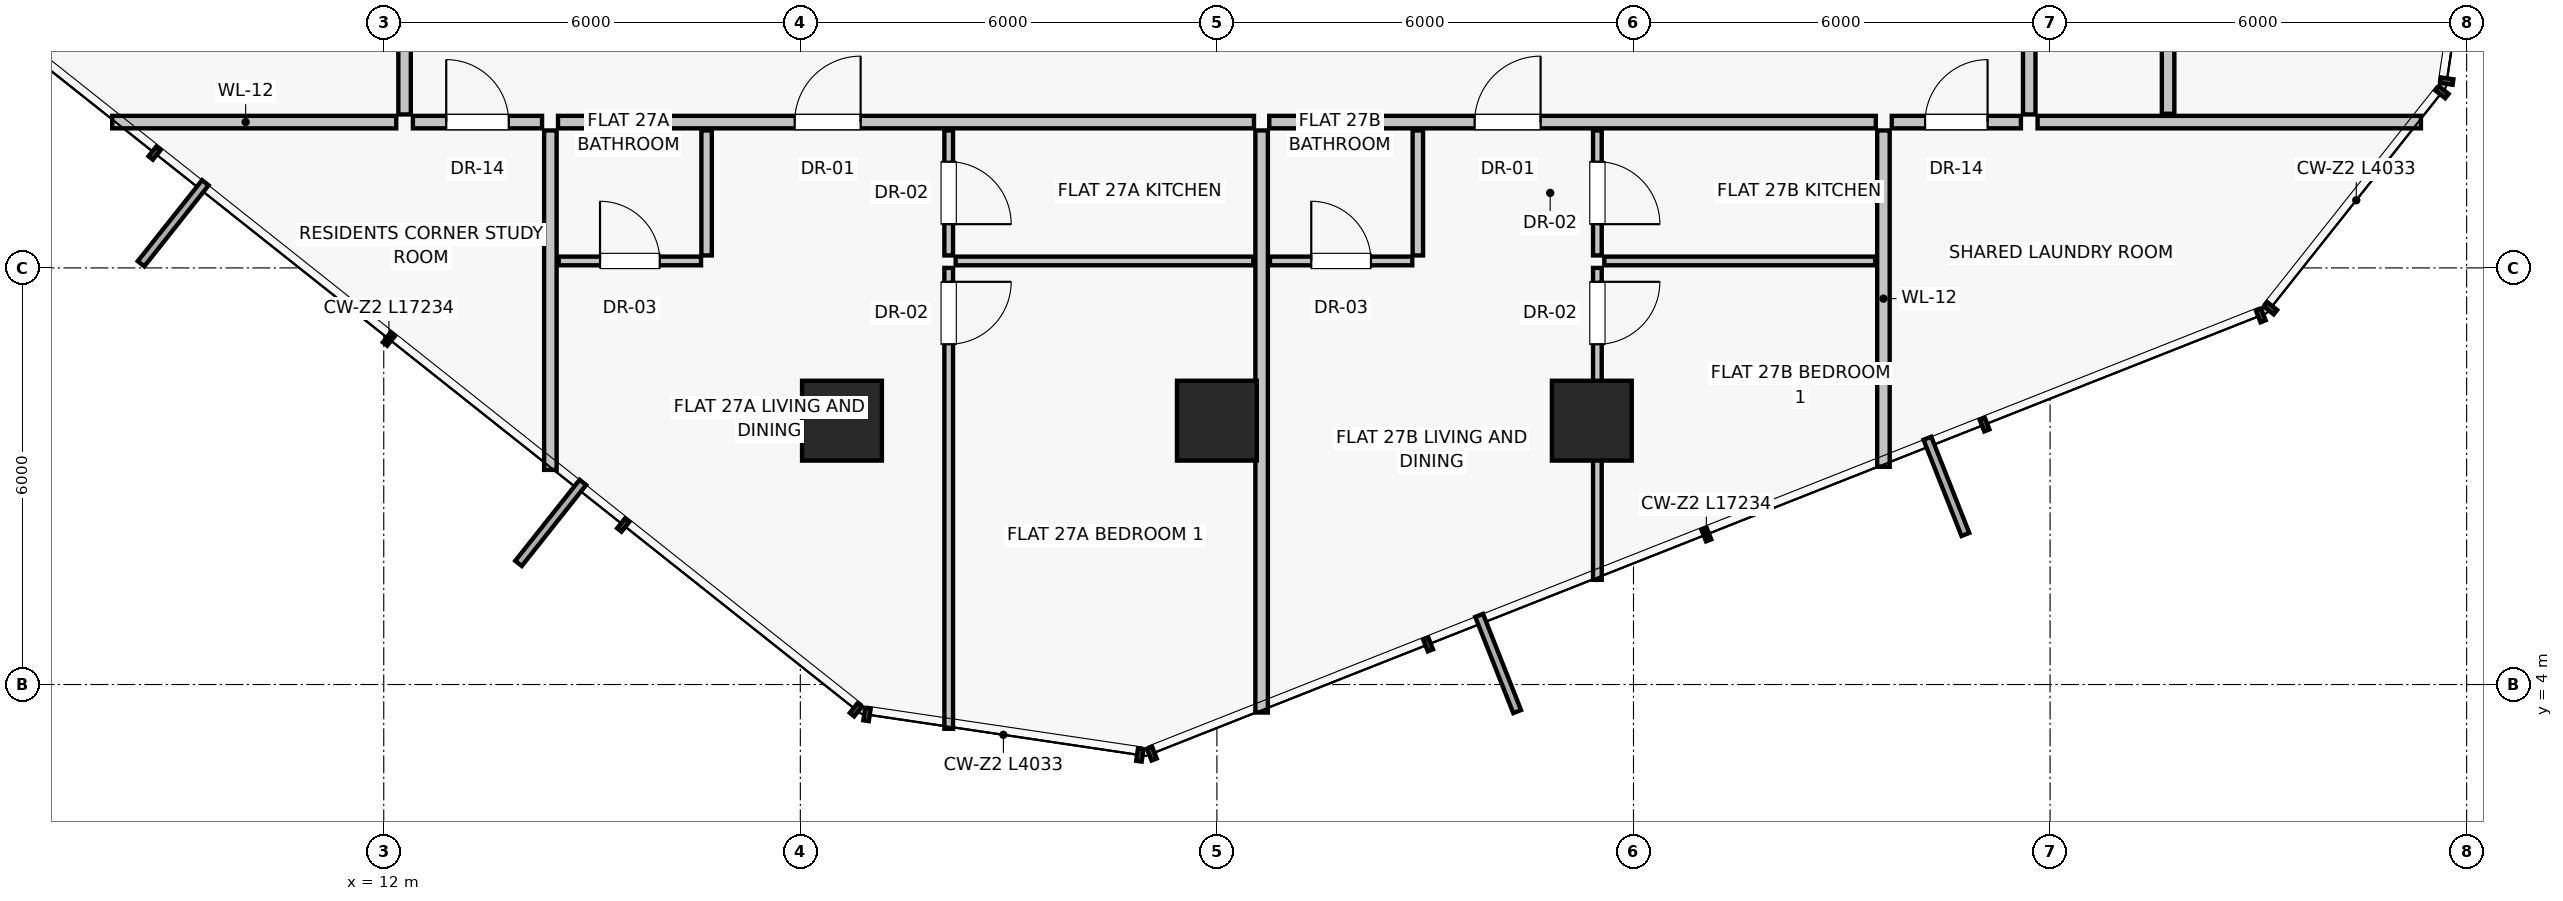
"""IFC4 building model, lengths in metres.
Left out: names, types, materials, properties, quantities, classifications, styles, units other than length and angle.
Written with IfcOpenShell. Run it as: python <this file> out.ifc"""

import sys

from ifc_helpers import new_model, si_unit, direction, frame, frame_2d, origin, origin_2d, place, context, subcontext, project, spatial, rectangle, extrude, source, transform, mapped, element, fill, save


model = new_model("IFC4")
c1 = context("Model", 3, precision=1e-05, world=origin(), true_north=direction((0.0, 1.0)))
c2 = subcontext(c1, "Body", "Model", "MODEL_VIEW")
j1 = project(units=[si_unit("LENGTHUNIT", "METRE"), si_unit("PLANEANGLEUNIT", "RADIAN")], contexts=[c1])
p1 = place(None, origin())
s1 = spatial("IfcSite", under=j1, at=p1, CompositionType="ELEMENT")
p2 = place(p1, origin())
s2 = spatial("IfcBuilding", under=s1, at=p2, CompositionType="ELEMENT")
p3 = place(p2, frame((0.0, 0.0, 99.2)))
s3 = spatial("IfcBuildingStorey", under=s2, at=p3, CompositionType="ELEMENT", Elevation=99.2)
for number, where, z_axis, x_axis in (
    (1, (18.6, 7.8, 0.0), (0.0, 0.0, 1.0), (1.0, 0.0, 0.0)),
    (2, (24.0, 7.8, 0.0), (0.0, 0.0, 1.0), (1.0, 0.0, 0.0)),
    (3, (29.4, 7.8, 0.0), (0.0, 0.0, 1.0), (1.0, 0.0, 0.0)),
):
    element("IfcColumn", number, at=place(p3, frame(where, z_axis=z_axis, x_axis=x_axis)), inside=s3, PredefinedType="COLUMN", context=c2, shape_type="SweptSolid", body=[
        extrude(rectangle(XDim=1.15, YDim=1.15, at=origin_2d()), origin(), (0.0, 0.0, 1.0), 3.25),
    ])
p4 = place(p3, frame((14.4, 11.98, 0.0), z_axis=(0.0, 0.0, 1.0), x_axis=(0.0, -1.0, 0.0)))
e4 = element("IfcWall", 4, at=p4, inside=s3, PredefinedType="PARTITIONING", context=c2, shape_type="SweptSolid", body=[
    extrude(rectangle(XDim=4.889, YDim=0.18, at=frame_2d((2.444, 0.0))), origin(), (0.0, 0.0, 1.0), 3.0),
])
p5 = place(p3, frame((33.6, 11.98, 0.0), z_axis=(0.0, 0.0, 1.0), x_axis=(0.0, -1.0, 0.0)))
e5 = element("IfcWall", 5, at=p5, inside=s3, PredefinedType="PARTITIONING", context=c2, shape_type="SweptSolid", body=[
    extrude(rectangle(XDim=4.845, YDim=0.18, at=frame_2d((2.422, 0.0))), origin(), (0.0, 0.0, 1.0), 3.0),
])
p6 = place(p3, frame((14.51, 12.1, 0.0), z_axis=(0.0, 0.0, 1.0), x_axis=(1.0, 0.0, 0.0)))
e6 = element("IfcWall", 6, at=p6, inside=s3, PredefinedType="PARTITIONING", context=c2, shape_type="SweptSolid", body=[
    extrude(rectangle(XDim=10.024, YDim=0.18, at=frame_2d((5.012, 0.0))), origin(), (0.0, 0.0, 1.0), 2.58),
])
p7 = place(p6, frame((3.408, 0.0, 0.0)))
e7 = element("IfcOpeningElement", 7, at=p7, cuts=e6, PredefinedType="OPENING", context=c2, shape_type="SweptSolid", body=[
    extrude(rectangle(XDim=0.95, YDim=2.02, at=frame_2d((0.475, 1.01))), frame((0.0, 0.1, 0.0), z_axis=(0.0, -1.0, 0.0), x_axis=(1.0, 0.0, 0.0)), (0.0, 0.0, 1.0), 0.2),
])
p8 = place(p3, frame((16.65, 11.98, 0.0), z_axis=(0.0, 0.0, 1.0), x_axis=(0.0, -1.0, 0.0)))
e8 = element("IfcWall", 8, at=p8, inside=s3, PredefinedType="PARTITIONING", context=c2, shape_type="SweptSolid", body=[
    extrude(rectangle(XDim=1.8, YDim=0.15, at=frame_2d((0.9, 0.0))), origin(), (0.0, 0.0, 1.0), 3.0),
])
p9 = place(p3, frame((14.52, 10.1, 0.0), z_axis=(0.0, 0.0, 1.0), x_axis=(1.0, 0.0, 0.0)))
e9 = element("IfcWall", 9, at=p9, inside=s3, PredefinedType="PARTITIONING", context=c2, shape_type="SweptSolid", body=[
    extrude(rectangle(XDim=2.05, YDim=0.125, at=frame_2d((1.025, 0.0))), origin(), (0.0, 0.0, 1.0), 3.0),
])
p10 = place(p9, frame((0.595, 0.0, 0.0)))
e10 = element("IfcOpeningElement", 10, at=p10, cuts=e9, PredefinedType="OPENING", context=c2, shape_type="SweptSolid", body=[
    extrude(rectangle(XDim=0.86, YDim=2.01, at=frame_2d((0.43, 1.005))), frame((0.0, 0.073, 0.0), z_axis=(0.0, -1.0, 0.0), x_axis=(1.0, 0.0, 0.0)), (0.0, 0.0, 1.0), 0.145),
])
p11 = place(p3, frame((20.137, 11.98, 0.0), z_axis=(0.0, 0.0, 1.0), x_axis=(0.0, -1.0, 0.0)))
e11 = element("IfcWall", 11, at=p11, inside=s3, PredefinedType="PARTITIONING", context=c2, shape_type="SweptSolid", body=[
    extrude(rectangle(XDim=1.8, YDim=0.125, at=frame_2d((0.9, 0.0))), origin(), (0.0, 0.0, 1.0), 3.0),
])
p12 = place(p11, frame((0.45, 0.0, 0.0)))
e12 = element("IfcOpeningElement", 12, at=p12, cuts=e11, PredefinedType="OPENING", context=c2, shape_type="SweptSolid", body=[
    extrude(rectangle(XDim=0.9, YDim=2.01, at=frame_2d((0.45, 1.005))), frame((0.0, 0.073, 0.0), z_axis=(0.0, -1.0, 0.0), x_axis=(1.0, 0.0, 0.0)), (0.0, 0.0, 1.0), 0.145),
])
p13 = place(p3, frame((20.237, 10.1, 0.0), z_axis=(0.0, 0.0, 1.0), x_axis=(1.0, 0.0, 0.0)))
e13 = element("IfcWall", 13, at=p13, inside=s3, PredefinedType="PARTITIONING", context=c2, shape_type="SweptSolid", body=[
    extrude(rectangle(XDim=4.287, YDim=0.125, at=frame_2d((2.144, 0.0))), origin(), (0.0, 0.0, 1.0), 3.0),
])
p14 = place(p3, frame((20.137, 10.0, 0.0), z_axis=(0.0, 0.0, 1.0), x_axis=(0.0, -1.0, 0.0)))
e14 = element("IfcWall", 14, at=p14, inside=s3, PredefinedType="PARTITIONING", context=c2, shape_type="SweptSolid", body=[
    extrude(rectangle(XDim=6.638, YDim=0.125, at=frame_2d((3.319, 0.0))), origin(), (0.0, 0.0, 1.0), 3.0),
])
p15 = place(p14, frame((0.2, 0.0, 0.0)))
e15 = element("IfcOpeningElement", 15, at=p15, cuts=e14, PredefinedType="OPENING", context=c2, shape_type="SweptSolid", body=[
    extrude(rectangle(XDim=0.9, YDim=2.01, at=frame_2d((0.45, 1.005))), frame((0.0, 0.073, 0.0), z_axis=(0.0, -1.0, 0.0), x_axis=(1.0, 0.0, 0.0)), (0.0, 0.0, 1.0), 0.145),
])
p16 = place(p3, frame((24.644, 11.98, 0.0), z_axis=(0.0, 0.0, 1.0), x_axis=(0.0, -1.0, 0.0)))
e16 = element("IfcWall", 16, at=p16, inside=s3, PredefinedType="PARTITIONING", context=c2, shape_type="SweptSolid", body=[
    extrude(rectangle(XDim=8.383, YDim=0.18, at=frame_2d((4.192, 0.0))), origin(), (0.0, 0.0, 1.0), 3.0),
])
p17 = place(p3, frame((24.754, 12.1, 0.0), z_axis=(0.0, 0.0, 1.0), x_axis=(1.0, 0.0, 0.0)))
e17 = element("IfcWall", 17, at=p17, inside=s3, PredefinedType="PARTITIONING", context=c2, shape_type="SweptSolid", body=[
    extrude(rectangle(XDim=8.736, YDim=0.18, at=frame_2d((4.368, 0.0))), origin(), (0.0, 0.0, 1.0), 2.58),
])
p18 = place(p17, frame((2.958, 0.0, 0.0)))
e18 = element("IfcOpeningElement", 18, at=p18, cuts=e17, PredefinedType="OPENING", context=c2, shape_type="SweptSolid", body=[
    extrude(rectangle(XDim=0.95, YDim=2.02, at=frame_2d((0.475, 1.01))), frame((0.0, 0.1, 0.0), z_axis=(0.0, -1.0, 0.0), x_axis=(1.0, 0.0, 0.0)), (0.0, 0.0, 1.0), 0.2),
])
p19 = place(p3, frame((26.894, 11.98, 0.0), z_axis=(0.0, 0.0, 1.0), x_axis=(0.0, -1.0, 0.0)))
e19 = element("IfcWall", 19, at=p19, inside=s3, PredefinedType="PARTITIONING", context=c2, shape_type="SweptSolid", body=[
    extrude(rectangle(XDim=1.8, YDim=0.15, at=frame_2d((0.9, 0.0))), origin(), (0.0, 0.0, 1.0), 3.0),
])
p20 = place(p3, frame((24.764, 10.1, 0.0), z_axis=(0.0, 0.0, 1.0), x_axis=(1.0, 0.0, 0.0)))
e20 = element("IfcWall", 20, at=p20, inside=s3, PredefinedType="PARTITIONING", context=c2, shape_type="SweptSolid", body=[
    extrude(rectangle(XDim=2.05, YDim=0.125, at=frame_2d((1.025, 0.0))), origin(), (0.0, 0.0, 1.0), 3.0),
])
p21 = place(p20, frame((0.595, 0.0, 0.0)))
e21 = element("IfcOpeningElement", 21, at=p21, cuts=e20, PredefinedType="OPENING", context=c2, shape_type="SweptSolid", body=[
    extrude(rectangle(XDim=0.86, YDim=2.01, at=frame_2d((0.43, 1.005))), frame((0.0, 0.073, 0.0), z_axis=(0.0, -1.0, 0.0), x_axis=(1.0, 0.0, 0.0)), (0.0, 0.0, 1.0), 0.145),
])
p22 = place(p3, frame((29.48, 11.98, 0.0), z_axis=(0.0, 0.0, 1.0), x_axis=(0.0, -1.0, 0.0)))
e22 = element("IfcWall", 22, at=p22, inside=s3, PredefinedType="PARTITIONING", context=c2, shape_type="SweptSolid", body=[
    extrude(rectangle(XDim=1.8, YDim=0.125, at=frame_2d((0.9, 0.0))), origin(), (0.0, 0.0, 1.0), 2.378),
])
p23 = place(p22, frame((0.45, 0.0, 0.0)))
e23 = element("IfcOpeningElement", 23, at=p23, cuts=e22, PredefinedType="OPENING", context=c2, shape_type="SweptSolid", body=[
    extrude(rectangle(XDim=0.9, YDim=2.01, at=frame_2d((0.45, 1.005))), frame((0.0, 0.073, 0.0), z_axis=(0.0, -1.0, 0.0), x_axis=(1.0, 0.0, 0.0)), (0.0, 0.0, 1.0), 0.145),
])
p24 = place(p3, frame((29.58, 10.1, 0.0), z_axis=(0.0, 0.0, 1.0), x_axis=(1.0, 0.0, 0.0)))
e24 = element("IfcWall", 24, at=p24, inside=s3, PredefinedType="PARTITIONING", context=c2, shape_type="SweptSolid", body=[
    extrude(rectangle(XDim=3.9, YDim=0.125, at=frame_2d((1.95, 0.0))), origin(), (0.0, 0.0, 1.0), 3.0),
])
p25 = place(p3, frame((29.48, 10.0, 0.0), z_axis=(0.0, 0.0, 1.0), x_axis=(0.0, -1.0, 0.0)))
e25 = element("IfcWall", 25, at=p25, inside=s3, PredefinedType="PARTITIONING", context=c2, shape_type="SweptSolid", body=[
    extrude(rectangle(XDim=4.493, YDim=0.125, at=frame_2d((2.246, 0.0))), origin(), (0.0, 0.0, 1.0), 2.378),
])
p26 = place(p25, frame((0.2, 0.0, 0.0)))
e26 = element("IfcOpeningElement", 26, at=p26, cuts=e25, PredefinedType="OPENING", context=c2, shape_type="SweptSolid", body=[
    extrude(rectangle(XDim=0.9, YDim=2.01, at=frame_2d((0.45, 1.005))), frame((0.0, 0.073, 0.0), z_axis=(0.0, -1.0, 0.0), x_axis=(1.0, 0.0, 0.0)), (0.0, 0.0, 1.0), 0.145),
])
p27 = place(p3, frame((12.18, 12.1, 0.0), z_axis=(0.0, 0.0, 1.0), x_axis=(-1.0, 0.0, 0.0)))
e27 = element("IfcWall", 27, at=p27, inside=s3, PredefinedType="PARTITIONING", context=c2, shape_type="SweptSolid", body=[
    extrude(rectangle(XDim=4.091, YDim=0.18, at=frame_2d((2.045, 0.0))), origin(), (0.0, 0.0, 1.0), 3.0),
])
p28 = place(p3, frame((12.3, 12.21, 0.0), z_axis=(0.0, 0.0, 1.0), x_axis=(0.0, 1.0, 0.0)))
e28 = element("IfcWall", 28, at=p28, inside=s3, PredefinedType="PARTITIONING", context=c2, shape_type="SweptSolid", body=[
    extrude(rectangle(XDim=4.626, YDim=0.18, at=frame_2d((2.313, 0.0))), origin(), (0.0, 0.0, 1.0), 3.0),
])
p29 = place(p28, frame((1.813, 0.0, 0.0)))
e29 = element("IfcOpeningElement", 29, at=p29, cuts=e28, PredefinedType="OPENING", context=c2, shape_type="SweptSolid", body=[
    extrude(rectangle(XDim=1.0, YDim=2.01, at=frame_2d((0.5, 1.005))), frame((0.0, 0.1, 0.0), z_axis=(0.0, -1.0, 0.0), x_axis=(1.0, 0.0, 0.0)), (0.0, 0.0, 1.0), 0.2),
])
p30 = place(p3, frame((35.82, 12.1, 0.0), z_axis=(0.0, 0.0, 1.0), x_axis=(1.0, 0.0, 0.0)))
e30 = element("IfcWall", 30, at=p30, inside=s3, PredefinedType="PARTITIONING", context=c2, shape_type="SweptSolid", body=[
    extrude(rectangle(XDim=5.521, YDim=0.18, at=frame_2d((2.761, 0.0))), origin(), (0.0, 0.0, 1.0), 3.0),
])
p31 = place(p3, frame((35.7, 12.21, 0.0), z_axis=(0.0, 0.0, 1.0), x_axis=(0.0, 1.0, 0.0)))
e31 = element("IfcWall", 31, at=p31, inside=s3, PredefinedType="PARTITIONING", context=c2, shape_type="SweptSolid", body=[
    extrude(rectangle(XDim=6.28, YDim=0.18, at=frame_2d((3.14, 0.0))), origin(), (0.0, 0.0, 1.0), 2.58),
])
p32 = place(p31, frame((2.64, 0.0, 0.0)))
e32 = element("IfcOpeningElement", 32, at=p32, cuts=e31, PredefinedType="OPENING", context=c2, shape_type="SweptSolid", body=[
    extrude(rectangle(XDim=1.0, YDim=2.01, at=frame_2d((0.5, 1.005))), frame((0.0, 0.1, 0.0), z_axis=(0.0, -1.0, 0.0), x_axis=(1.0, 0.0, 0.0)), (0.0, 0.0, 1.0), 0.2),
])
p33 = place(p3, frame((37.7, 12.22, 0.0), z_axis=(0.0, 0.0, 1.0), x_axis=(0.0, 1.0, 0.0)))
e33 = element("IfcWall", 33, at=p33, inside=s3, PredefinedType="PARTITIONING", context=c2, shape_type="SweptSolid", body=[
    extrude(rectangle(XDim=6.28, YDim=0.18, at=frame_2d((3.14, 0.0))), origin(), (0.0, 0.0, 1.0), 3.0),
])
p34 = place(p3, frame((12.42, 12.1, 0.0), z_axis=(0.0, 0.0, 1.0), x_axis=(1.0, 0.0, 0.0)))
e34 = element("IfcWall", 34, at=p34, inside=s3, PredefinedType="PARTITIONING", context=c2, shape_type="SweptSolid", body=[
    extrude(rectangle(XDim=1.86, YDim=0.18, at=frame_2d((0.93, 0.0))), origin(), (0.0, 0.0, 1.0), 3.0),
])
p35 = place(p34, frame((0.48, 0.0, 0.0)))
e35 = element("IfcOpeningElement", 35, at=p35, cuts=e34, PredefinedType="OPENING", context=c2, shape_type="SweptSolid", body=[
    extrude(rectangle(XDim=0.9, YDim=2.01, at=frame_2d((0.45, 1.005))), frame((0.0, 0.1, 0.0), z_axis=(0.0, -1.0, 0.0), x_axis=(1.0, 0.0, 0.0)), (0.0, 0.0, 1.0), 0.2),
])
p36 = place(p3, frame((33.72, 12.1, 0.0), z_axis=(0.0, 0.0, 1.0), x_axis=(1.0, 0.0, 0.0)))
e36 = element("IfcWall", 36, at=p36, inside=s3, PredefinedType="PARTITIONING", context=c2, shape_type="SweptSolid", body=[
    extrude(rectangle(XDim=1.86, YDim=0.18, at=frame_2d((0.93, 0.0))), origin(), (0.0, 0.0, 1.0), 3.0),
])
p37 = place(p36, frame((0.48, 0.0, 0.0)))
e37 = element("IfcOpeningElement", 37, at=p37, cuts=e36, PredefinedType="OPENING", context=c2, shape_type="SweptSolid", body=[
    extrude(rectangle(XDim=0.9, YDim=2.01, at=frame_2d((0.45, 1.005))), frame((0.0, 0.1, 0.0), z_axis=(0.0, -1.0, 0.0), x_axis=(1.0, 0.0, 0.0)), (0.0, 0.0, 1.0), 0.2),
])
m1 = source(origin(), c2, "Body", "SweptSolid", [
    extrude(rectangle(XDim=0.95, YDim=2.02, at=frame_2d((0.475, 1.01))), frame((0.0, 0.025, 0.0), z_axis=(0.0, -1.0, 0.0), x_axis=(1.0, 0.0, 0.0)), (0.0, 0.0, 1.0), 0.05),
])
p38 = place(p7, origin())
e38 = element("IfcDoor", 38, at=p38, inside=s3, OperationType="SINGLE_SWING_RIGHT", PredefinedType="DOOR", context=c2, shape_type="MappedRepresentation", body=[
    mapped(m1, transform((0.0, 0.0, 0.0), scale=1.0)),
])
fill(e7, e38)
m2 = source(origin(), c2, "Body", "SweptSolid", [
    extrude(rectangle(XDim=0.86, YDim=2.01, at=frame_2d((0.43, 1.005))), frame((0.0, 0.025, 0.0), z_axis=(0.0, -1.0, 0.0), x_axis=(1.0, 0.0, 0.0)), (0.0, 0.0, 1.0), 0.05),
])
p39 = place(p10, origin())
e39 = element("IfcDoor", 39, at=p39, inside=s3, OperationType="SINGLE_SWING_LEFT", PredefinedType="DOOR", context=c2, shape_type="MappedRepresentation", body=[
    mapped(m2, transform((0.0, 0.0, 0.0), scale=1.0)),
])
fill(e10, e39)
m3 = source(origin(), c2, "Body", "SweptSolid", [
    extrude(rectangle(XDim=0.9, YDim=2.01, at=frame_2d((0.45, 1.005))), frame((0.0, 0.025, 0.0), z_axis=(0.0, -1.0, 0.0), x_axis=(1.0, 0.0, 0.0)), (0.0, 0.0, 1.0), 0.05),
])
p40 = place(p12, origin())
e40 = element("IfcDoor", 40, at=p40, inside=s3, OperationType="SINGLE_SWING_RIGHT", PredefinedType="DOOR", context=c2, shape_type="MappedRepresentation", body=[
    mapped(m3, transform((0.0, 0.0, 0.0), scale=1.0)),
])
fill(e12, e40)
p41 = place(p15, origin())
e41 = element("IfcDoor", 41, at=p41, inside=s3, OperationType="SINGLE_SWING_LEFT", PredefinedType="DOOR", context=c2, shape_type="MappedRepresentation", body=[
    mapped(m3, transform((0.0, 0.0, 0.0), scale=1.0)),
])
fill(e15, e41)
p42 = place(p18, origin())
e42 = element("IfcDoor", 42, at=p42, inside=s3, OperationType="SINGLE_SWING_RIGHT", PredefinedType="DOOR", context=c2, shape_type="MappedRepresentation", body=[
    mapped(m1, transform((0.0, 0.0, 0.0), scale=1.0)),
])
fill(e18, e42)
p43 = place(p21, origin())
e43 = element("IfcDoor", 43, at=p43, inside=s3, OperationType="SINGLE_SWING_LEFT", PredefinedType="DOOR", context=c2, shape_type="MappedRepresentation", body=[
    mapped(m2, transform((0.0, 0.0, 0.0), scale=1.0)),
])
fill(e21, e43)
p44 = place(p23, origin())
e44 = element("IfcDoor", 44, at=p44, inside=s3, OperationType="SINGLE_SWING_RIGHT", PredefinedType="DOOR", context=c2, shape_type="MappedRepresentation", body=[
    mapped(m3, transform((0.0, 0.0, 0.0), scale=1.0)),
])
fill(e23, e44)
p45 = place(p26, origin())
e45 = element("IfcDoor", 45, at=p45, inside=s3, OperationType="SINGLE_SWING_LEFT", PredefinedType="DOOR", context=c2, shape_type="MappedRepresentation", body=[
    mapped(m3, transform((0.0, 0.0, 0.0), scale=1.0)),
])
fill(e26, e45)
p46 = place(p35, origin())
e46 = element("IfcDoor", 46, at=p46, inside=s3, OperationType="SINGLE_SWING_LEFT", PredefinedType="DOOR", context=c2, shape_type="MappedRepresentation", body=[
    mapped(m3, transform((0.0, 0.0, 0.0), scale=1.0)),
])
fill(e35, e46)
p47 = place(p37, origin())
e47 = element("IfcDoor", 47, at=p47, inside=s3, OperationType="SINGLE_SWING_RIGHT", PredefinedType="DOOR", context=c2, shape_type="MappedRepresentation", body=[
    mapped(m3, transform((0.0, 0.0, 0.0), scale=1.0)),
])
fill(e37, e47)
save(model, sys.argv[1])
